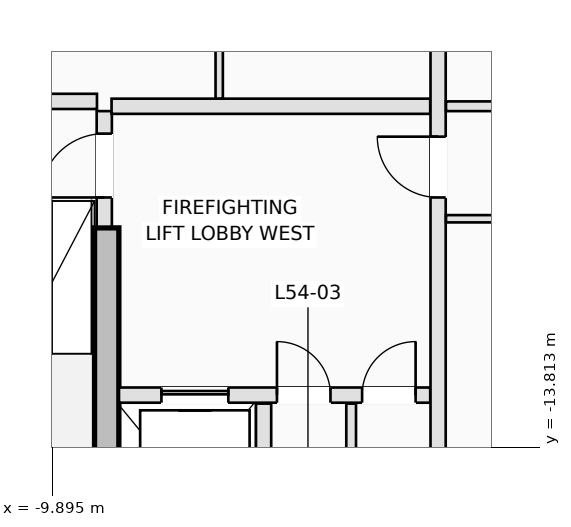
"""IFC4 building model, lengths in metres.
Left out: names, types, materials, properties, quantities, classifications, styles, units other than length and angle.
Written with IfcOpenShell. Run it as: python <this file> out.ifc"""

import sys

from ifc_helpers import new_model, si_unit, direction, frame, frame_2d, origin, place, context, subcontext, project, spatial, rectangle, extrude, element, fill, save


model = new_model("IFC4")
c1 = context("Model", 3, precision=1e-05, world=origin(), true_north=direction((0.0, 1.0)))
c2 = subcontext(c1, "Body", "Model", "MODEL_VIEW")
j1 = project(units=[si_unit("LENGTHUNIT", "METRE"), si_unit("PLANEANGLEUNIT", "RADIAN")], contexts=[c1])
p1 = place(None, origin())
s1 = spatial("IfcSite", under=j1, at=p1, CompositionType="ELEMENT")
p2 = place(p1, origin())
s2 = spatial("IfcBuilding", under=s1, at=p2, CompositionType="ELEMENT")
p3 = place(p2, frame((0.0, 0.0, 197.4)))
s3 = spatial("IfcBuildingStorey", under=s2, at=p3, CompositionType="ELEMENT", Elevation=197.4)
p4 = place(p3, frame((-9.0, -16.15, 0.0), z_axis=(0.0, 0.0, 1.0), x_axis=(0.0, 1.0, 0.0)))
e1 = element("IfcWall", 1, at=p4, inside=s3, PredefinedType="SHEAR", context=c2, shape_type="SweptSolid", body=[
    extrude(rectangle(XDim=5.95, YDim=0.4, at=frame_2d((2.975, 0.0))), origin(), (0.0, 0.0, 1.0), 3.5),
])
p5 = place(p3, frame((-9.04, -10.18, 0.0), z_axis=(0.0, 0.0, 1.0), x_axis=(0.0, 1.0, 0.0)))
e2 = element("IfcWall", 2, at=p5, inside=s3, PredefinedType="PARTITIONING", context=c2, shape_type="SweptSolid", body=[
    extrude(rectangle(XDim=1.9, YDim=0.25, at=frame_2d((0.95, 0.0))), origin(), (0.0, 0.0, 1.0), 3.25),
])
p6 = place(p5, frame((0.48, 0.0, 0.0)))
e3 = element("IfcOpeningElement", 3, at=p6, cuts=e2, PredefinedType="OPENING", context=c2, shape_type="SweptSolid", body=[
    extrude(rectangle(XDim=1.05, YDim=2.15, at=frame_2d((0.525, 1.075))), frame((0.0, 0.135, 0.0), z_axis=(0.0, -1.0, 0.0), x_axis=(1.0, 0.0, 0.0)), (0.0, 0.0, 1.0), 0.27),
])
p7 = place(p3, frame((-12.38, -8.12, 0.0), z_axis=(0.0, 0.0, 1.0), x_axis=(1.0, 0.0, 0.0)))
e4 = element("IfcWall", 4, at=p7, inside=s3, PredefinedType="PARTITIONING", context=c2, shape_type="SweptSolid", body=[
    extrude(rectangle(XDim=3.22, YDim=0.25, at=frame_2d((1.61, 0.0))), origin(), (0.0, 0.0, 1.0), 3.25),
])
p8 = place(p3, frame((-8.798, -12.95, 0.0), z_axis=(0.0, 0.0, 1.0), x_axis=(1.0, 0.0, 0.0)))
e5 = element("IfcWall", 5, at=p8, inside=s3, PredefinedType="PARTITIONING", context=c2, shape_type="SweptSolid", body=[
    extrude(rectangle(XDim=5.118, YDim=0.25, at=frame_2d((2.559, 0.0))), origin(), (0.0, 0.0, 1.0), 3.25),
])
p9 = place(p8, frame((0.698, 0.0, 0.0)))
e6 = element("IfcOpeningElement", 6, at=p9, cuts=e5, PredefinedType="OPENING", context=c2, shape_type="SweptSolid", body=[
    extrude(rectangle(XDim=1.1, YDim=2.15, at=frame_2d((0.55, 1.075))), frame((0.0, 0.135, 0.0), z_axis=(0.0, -1.0, 0.0), x_axis=(1.0, 0.0, 0.0)), (0.0, 0.0, 1.0), 0.27),
])
p10 = place(p8, frame((2.598, 0.0, 0.0)))
e7 = element("IfcOpeningElement", 7, at=p10, cuts=e5, PredefinedType="OPENING", context=c2, shape_type="SweptSolid", body=[
    extrude(rectangle(XDim=0.88, YDim=2.1, at=frame_2d((0.44, 1.05))), frame((0.0, 0.135, 0.0), z_axis=(0.0, -1.0, 0.0), x_axis=(1.0, 0.0, 0.0)), (0.0, 0.0, 1.0), 0.27),
])
p11 = place(p8, frame((3.998, 0.0, 0.0)))
e8 = element("IfcOpeningElement", 8, at=p11, cuts=e5, PredefinedType="OPENING", context=c2, shape_type="SweptSolid", body=[
    extrude(rectangle(XDim=0.88, YDim=2.1, at=frame_2d((0.44, 1.05))), frame((0.0, 0.135, 0.0), z_axis=(0.0, -1.0, 0.0), x_axis=(1.0, 0.0, 0.0)), (0.0, 0.0, 1.0), 0.27),
])
p12 = place(p3, frame((-6.42, -15.92, 0.0), z_axis=(0.0, 0.0, 1.0), x_axis=(0.0, 1.0, 0.0)))
e9 = element("IfcWall", 9, at=p12, inside=s3, PredefinedType="PARTITIONING", context=c2, shape_type="SweptSolid", body=[
    extrude(rectangle(XDim=2.83, YDim=0.25, at=frame_2d((1.415, 0.0))), origin(), (0.0, 0.0, 1.0), 3.25),
])
p13 = place(p3, frame((-4.98, -15.92, 0.0), z_axis=(0.0, 0.0, 1.0), x_axis=(0.0, 1.0, 0.0)))
e10 = element("IfcWall", 10, at=p13, inside=s3, PredefinedType="PARTITIONING", context=c2, shape_type="SweptSolid", body=[
    extrude(rectangle(XDim=2.83, YDim=0.16, at=frame_2d((1.415, 0.0))), origin(), (0.0, 0.0, 1.0), 3.25),
])
p14 = place(p3, frame((-8.92, -8.2, 0.0), z_axis=(0.0, 0.0, 1.0), x_axis=(1.0, 0.0, 0.0)))
e11 = element("IfcWall", 11, at=p14, inside=s3, PredefinedType="PARTITIONING", context=c2, shape_type="SweptSolid", body=[
    extrude(rectangle(XDim=5.24, YDim=0.25, at=frame_2d((2.62, 0.0))), origin(), (0.0, 0.0, 1.0), 3.25),
])
p15 = place(p3, frame((-3.55, -15.898, 0.0), z_axis=(0.0, 0.0, 1.0), x_axis=(0.0, 1.0, 0.0)))
e12 = element("IfcWall", 12, at=p15, inside=s3, PredefinedType="PARTITIONING", context=c2, shape_type="SweptSolid", body=[
    extrude(rectangle(XDim=10.558, YDim=0.25, at=frame_2d((5.279, 0.0))), origin(), (0.0, 0.0, 1.0), 3.25),
])
p16 = place(p15, frame((6.198, 0.0, 0.0)))
e13 = element("IfcOpeningElement", 13, at=p16, cuts=e12, PredefinedType="OPENING", context=c2, shape_type="SweptSolid", body=[
    extrude(rectangle(XDim=1.0, YDim=2.15, at=frame_2d((0.5, 1.075))), frame((0.0, 0.135, 0.0), z_axis=(0.0, -1.0, 0.0), x_axis=(1.0, 0.0, 0.0)), (0.0, 0.0, 1.0), 0.27),
])
p17 = place(p3, frame((-7.15, -8.073, 0.0), z_axis=(0.0, 0.0, 1.0), x_axis=(0.0, 1.0, 0.0)))
e14 = element("IfcWall", 14, at=p17, inside=s3, PredefinedType="PARTITIONING", context=c2, shape_type="SweptSolid", body=[
    extrude(rectangle(XDim=2.733, YDim=0.12, at=frame_2d((1.366, 0.0))), origin(), (0.0, 0.0, 1.0), 3.25),
])
p18 = place(p3, frame((-3.42, -8.2, 0.0), z_axis=(0.0, 0.0, 1.0), x_axis=(1.0, 0.0, 0.0)))
e15 = element("IfcWall", 15, at=p18, inside=s3, PredefinedType="PARTITIONING", context=c2, shape_type="SweptSolid", body=[
    extrude(rectangle(XDim=6.84, YDim=0.16, at=frame_2d((3.42, 0.0))), origin(), (0.0, 0.0, 1.0), 3.25),
])
p19 = place(p18, frame((2.92, 0.0, 0.0)))
e16 = element("IfcOpeningElement", 16, at=p19, cuts=e15, PredefinedType="OPENING", context=c2, shape_type="SweptSolid", body=[
    extrude(rectangle(XDim=1.0, YDim=2.15, at=frame_2d((0.5, 1.075))), frame((0.0, 0.09, 0.0), z_axis=(0.0, -1.0, 0.0), x_axis=(1.0, 0.0, 0.0)), (0.0, 0.0, 1.0), 0.18),
])
p20 = place(p3, frame((-3.42, -10.05, 0.0), z_axis=(0.0, 0.0, 1.0), x_axis=(1.0, 0.0, 0.0)))
e17 = element("IfcWall", 17, at=p20, inside=s3, PredefinedType="PARTITIONING", context=c2, shape_type="SweptSolid", body=[
    extrude(rectangle(XDim=6.84, YDim=0.12, at=frame_2d((3.42, 0.0))), origin(), (0.0, 0.0, 1.0), 3.25),
])
p21 = place(p20, frame((1.85, 0.0, 0.0)))
e18 = element("IfcOpeningElement", 18, at=p21, cuts=e17, PredefinedType="OPENING", context=c2, shape_type="SweptSolid", body=[
    extrude(rectangle(XDim=0.92, YDim=2.12, at=frame_2d((0.46, 1.06))), frame((0.0, 0.07, 0.0), z_axis=(0.0, -1.0, 0.0), x_axis=(1.0, 0.0, 0.0)), (0.0, 0.0, 1.0), 0.14),
])
p22 = place(p20, frame((5.35, 0.0, 0.0)))
e19 = element("IfcOpeningElement", 19, at=p22, cuts=e17, PredefinedType="OPENING", context=c2, shape_type="SweptSolid", body=[
    extrude(rectangle(XDim=0.88, YDim=2.12, at=frame_2d((0.44, 1.06))), frame((0.0, 0.07, 0.0), z_axis=(0.0, -1.0, 0.0), x_axis=(1.0, 0.0, 0.0)), (0.0, 0.0, 1.0), 0.14),
])
p23 = place(p9, origin())
e20 = element("IfcDoor", 20, at=p23, inside=s3, OperationType="SLIDING_TO_LEFT", PredefinedType="DOOR", context=c2, shape_type="SweptSolid", body=[
    extrude(rectangle(XDim=1.1, YDim=2.15, at=frame_2d((0.55, 1.075))), frame((0.0, 0.025, 0.0), z_axis=(0.0, -1.0, 0.0), x_axis=(1.0, 0.0, 0.0)), (0.0, 0.0, 1.0), 0.05),
])
fill(e6, e20)
p24 = place(p6, origin())
e21 = element("IfcDoor", 21, at=p24, inside=s3, OperationType="SINGLE_SWING_LEFT", PredefinedType="DOOR", context=c2, shape_type="SweptSolid", body=[
    extrude(rectangle(XDim=1.05, YDim=2.15, at=frame_2d((0.525, 1.075))), frame((0.0, 0.025, 0.0), z_axis=(0.0, -1.0, 0.0), x_axis=(1.0, 0.0, 0.0)), (0.0, 0.0, 1.0), 0.05),
])
fill(e3, e21)
p25 = place(p10, origin())
e22 = element("IfcDoor", 22, at=p25, inside=s3, OperationType="SINGLE_SWING_LEFT", PredefinedType="TRAPDOOR", context=c2, shape_type="SweptSolid", body=[
    extrude(rectangle(XDim=0.88, YDim=2.1, at=frame_2d((0.44, 1.05))), frame((0.0, 0.025, 0.0), z_axis=(0.0, -1.0, 0.0), x_axis=(1.0, 0.0, 0.0)), (0.0, 0.0, 1.0), 0.05),
])
fill(e7, e22)
p26 = place(p11, origin())
e23 = element("IfcDoor", 23, at=p26, inside=s3, OperationType="SINGLE_SWING_RIGHT", PredefinedType="TRAPDOOR", context=c2, shape_type="SweptSolid", body=[
    extrude(rectangle(XDim=0.88, YDim=2.1, at=frame_2d((0.44, 1.05))), frame((0.0, 0.025, 0.0), z_axis=(0.0, -1.0, 0.0), x_axis=(1.0, 0.0, 0.0)), (0.0, 0.0, 1.0), 0.05),
])
fill(e8, e23)
p27 = place(p16, origin())
e24 = element("IfcDoor", 24, at=p27, inside=s3, OperationType="SINGLE_SWING_RIGHT", PredefinedType="DOOR", context=c2, shape_type="SweptSolid", body=[
    extrude(rectangle(XDim=1.0, YDim=2.15, at=frame_2d((0.5, 1.075))), frame((0.0, 0.025, 0.0), z_axis=(0.0, -1.0, 0.0), x_axis=(1.0, 0.0, 0.0)), (0.0, 0.0, 1.0), 0.05),
])
fill(e13, e24)
save(model, sys.argv[1])
